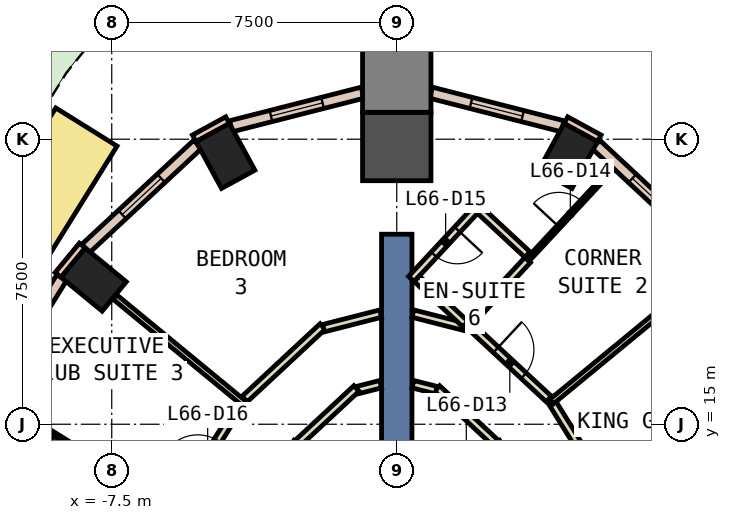
"""IFC4 building model, lengths in metres.
Left out: names, types, materials, properties, quantities, classifications, styles, units other than length and angle.
Written with IfcOpenShell. Run it as: python <this file> out.ifc"""

import sys

from ifc_helpers import new_model, si_unit, direction, frame, frame_2d, origin, origin_2d, place, context, subcontext, project, spatial, rectangle, extrude, element, fill, save


model = new_model("IFC4")
c1 = context("Model", 3, precision=1e-05, world=origin(), true_north=direction((0.0, 1.0)))
c2 = subcontext(c1, "Body", "Model", "MODEL_VIEW")
j1 = project(units=[si_unit("LENGTHUNIT", "METRE"), si_unit("PLANEANGLEUNIT", "RADIAN")], contexts=[c1])
p1 = place(None, origin())
s1 = spatial("IfcSite", under=j1, at=p1, CompositionType="ELEMENT")
p2 = place(p1, origin())
s2 = spatial("IfcBuilding", under=s1, at=p2, CompositionType="ELEMENT")
p3 = place(p2, frame((0.0, 0.0, 286.4)))
s3 = spatial("IfcBuildingStorey", under=s2, at=p3, CompositionType="ELEMENT", Elevation=286.4)
p4 = place(p3, frame((4.507, 22.059, 0.0), z_axis=(0.0, 0.0, 1.0), x_axis=(-0.877899414566, 0.478845087586, 0.0)))
e1 = element("IfcColumn", 1, at=p4, inside=s3, PredefinedType="COLUMN", context=c2, shape_type="SweptSolid", body=[
    extrude(rectangle(XDim=1.0, YDim=1.4, at=origin_2d()), origin(), (0.0, 0.0, 1.0), 3.26),
])
p5 = place(p3, frame((0.0, 22.308, 0.0), z_axis=(0.0, 0.0, 1.0), x_axis=(0.0, 1.0, 0.0)))
e2 = element("IfcColumn", 2, at=p5, inside=s3, PredefinedType="COLUMN", context=c2, shape_type="SweptSolid", body=[
    extrude(rectangle(XDim=1.8, YDim=1.8, at=origin_2d()), origin(), (0.0, 0.0, 1.0), 3.26),
])
for number, where, z_axis, x_axis in (
    (3, (-4.507, 22.059, 0.0), (0.0, 0.0, 1.0), (0.878, 0.479, 0.0)),
    (4, (-7.975, 18.807, 0.0), (0.0, 0.0, 1.0), (0.636, 0.772, 0.0)),
):
    element("IfcColumn", number, at=place(p3, frame(where, z_axis=z_axis, x_axis=x_axis)), inside=s3, PredefinedType="COLUMN", context=c2, shape_type="SweptSolid", body=[
        extrude(rectangle(XDim=1.0, YDim=1.4, at=origin_2d()), origin(), (0.0, 0.0, 1.0), 3.26),
    ])
p6 = place(p3, frame((0.0, 24.108, 0.0), z_axis=(0.0, 0.0, 1.0), x_axis=(0.0, 1.0, 0.0)))
e5 = element("IfcColumn", 5, at=p6, inside=s3, PredefinedType="COLUMN", context=c2, shape_type="SweptSolid", body=[
    extrude(rectangle(XDim=1.8, YDim=1.8, at=origin_2d()), origin(), (0.0, 0.0, 1.0), 3.26),
])
p7 = place(p3, frame((0.0, 11.0, -0.6), z_axis=(0.0, 0.0, 1.0), x_axis=(0.0, 1.0, 0.0)))
e6 = element("IfcWall", 6, at=p7, inside=s3, PredefinedType="SHEAR", context=c2, shape_type="SweptSolid", body=[
    extrude(rectangle(XDim=9.0, YDim=0.8, at=frame_2d((4.5, 0.0))), origin(), (0.0, 0.0, 1.0), 3.86),
])
for number, where, z_axis, x_axis in (
    (7, (5.329, 22.522, 0.0), (0.0, 0.0, 1.0), (-0.878, 0.479, 0.0)),
    (8, (-4.451, 23.001, 0.0), (0.0, 0.0, 1.0), (-0.878, -0.479, 0.0)),
    (9, (-8.275, 19.701, 0.0), (0.0, 0.0, 1.0), (-0.636, -0.772, 0.0)),
):
    element("IfcWall", number, at=place(p3, frame(where, z_axis=z_axis, x_axis=x_axis)), inside=s3, PredefinedType="STANDARD", context=c2, shape_type="SweptSolid", body=[
        extrude(rectangle(XDim=1.0, YDim=0.2, at=frame_2d((0.5, 0.0))), origin(), (0.0, 0.0, 1.0), 3.26),
    ])
p8 = place(p3, frame((8.184, 19.626, 0.0), z_axis=(0.0, 0.0, 1.0), x_axis=(-0.732397380344, 0.680877431896, 0.0)))
e10 = element("IfcWall", 10, at=p8, inside=s3, PredefinedType="STANDARD", context=c2, shape_type="SweptSolid", body=[
    extrude(rectangle(XDim=4.019, YDim=0.3, at=frame_2d((2.009, 0.0))), origin(), (0.0, 0.0, 1.0), 3.26),
])
p9 = place(p8, frame((1.309, 0.0, 0.9)))
e11 = element("IfcOpeningElement", 11, at=p9, cuts=e10, PredefinedType="OPENING", context=c2, shape_type="SweptSolid", body=[
    extrude(rectangle(XDim=1.4, YDim=2.0, at=frame_2d((0.7, 1.0))), frame((0.0, 0.16, 0.0), z_axis=(0.0, -1.0, 0.0), x_axis=(1.0, 0.0, 0.0)), (0.0, 0.0, 1.0), 0.32),
])
p10 = place(p3, frame((4.365, 22.84, 0.0), z_axis=(0.0, 0.0, 1.0), x_axis=(-0.968979290476, 0.247141932156, 0.0)))
e12 = element("IfcWall", 12, at=p10, inside=s3, PredefinedType="STANDARD", context=c2, shape_type="SweptSolid", body=[
    extrude(rectangle(XDim=3.577, YDim=0.3, at=frame_2d((1.789, 0.0))), origin(), (0.0, 0.0, 1.0), 3.26),
])
p11 = place(p10, frame((1.088, 0.0, 0.9)))
e13 = element("IfcOpeningElement", 13, at=p11, cuts=e12, PredefinedType="OPENING", context=c2, shape_type="SweptSolid", body=[
    extrude(rectangle(XDim=1.4, YDim=2.0, at=frame_2d((0.7, 1.0))), frame((0.0, 0.16, 0.0), z_axis=(0.0, -1.0, 0.0), x_axis=(1.0, 0.0, 0.0)), (0.0, 0.0, 1.0), 0.32),
])
p12 = place(p3, frame((-0.899, 23.724, 0.0), z_axis=(0.0, 0.0, 1.0), x_axis=(-0.968979290476, -0.247141932156, 0.0)))
e14 = element("IfcWall", 14, at=p12, inside=s3, PredefinedType="STANDARD", context=c2, shape_type="SweptSolid", body=[
    extrude(rectangle(XDim=3.577, YDim=0.3, at=frame_2d((1.789, 0.0))), origin(), (0.0, 0.0, 1.0), 3.26),
])
p13 = place(p12, frame((1.088, 0.0, 0.9)))
e15 = element("IfcOpeningElement", 15, at=p13, cuts=e14, PredefinedType="OPENING", context=c2, shape_type="SweptSolid", body=[
    extrude(rectangle(XDim=1.4, YDim=2.0, at=frame_2d((0.7, 1.0))), frame((0.0, 0.16, 0.0), z_axis=(0.0, -1.0, 0.0), x_axis=(1.0, 0.0, 0.0)), (0.0, 0.0, 1.0), 0.32),
])
p14 = place(p3, frame((-5.241, 22.362, 0.0), z_axis=(0.0, 0.0, 1.0), x_axis=(-0.732397380344, -0.680877431896, 0.0)))
e16 = element("IfcWall", 16, at=p14, inside=s3, PredefinedType="STANDARD", context=c2, shape_type="SweptSolid", body=[
    extrude(rectangle(XDim=4.019, YDim=0.3, at=frame_2d((2.009, 0.0))), origin(), (0.0, 0.0, 1.0), 3.26),
])
p15 = place(p14, frame((1.309, 0.0, 0.9)))
e17 = element("IfcOpeningElement", 17, at=p15, cuts=e16, PredefinedType="OPENING", context=c2, shape_type="SweptSolid", body=[
    extrude(rectangle(XDim=1.4, YDim=2.0, at=frame_2d((0.7, 1.0))), frame((0.0, 0.16, 0.0), z_axis=(0.0, -1.0, 0.0), x_axis=(1.0, 0.0, 0.0)), (0.0, 0.0, 1.0), 0.32),
])
p16 = place(p3, frame((-8.819, 18.855, 0.0), z_axis=(0.0, 0.0, 1.0), x_axis=(-0.527762071678, -0.849392250788, 0.0)))
e18 = element("IfcWall", 18, at=p16, inside=s3, PredefinedType="STANDARD", context=c2, shape_type="SweptSolid", body=[
    extrude(rectangle(XDim=7.276, YDim=0.3, at=frame_2d((3.638, 0.0))), origin(), (0.0, 0.0, 1.0), 3.26),
])
p17 = place(p16, frame((0.719, 0.0, 0.9)))
e19 = element("IfcOpeningElement", 19, at=p17, cuts=e18, PredefinedType="OPENING", context=c2, shape_type="SweptSolid", body=[
    extrude(rectangle(XDim=2.2, YDim=2.0, at=frame_2d((1.1, 1.0))), frame((0.0, 0.16, 0.0), z_axis=(0.0, -1.0, 0.0), x_axis=(1.0, 0.0, 0.0)), (0.0, 0.0, 1.0), 0.32),
])
p18 = place(p16, frame((4.357, 0.0, 0.9)))
e20 = element("IfcOpeningElement", 20, at=p18, cuts=e18, PredefinedType="OPENING", context=c2, shape_type="SweptSolid", body=[
    extrude(rectangle(XDim=2.2, YDim=2.0, at=frame_2d((1.1, 1.0))), frame((0.0, 0.16, 0.0), z_axis=(0.0, -1.0, 0.0), x_axis=(1.0, 0.0, 0.0)), (0.0, 0.0, 1.0), 0.32),
])
p19 = place(p3, frame((-8.167, 22.821, 0.0), z_axis=(0.0, 0.0, 1.0), x_axis=(-0.528631074262, -0.848851687472, 0.0)))
e21 = element("IfcWall", 21, at=p19, inside=s3, PredefinedType="STANDARD", context=c2, shape_type="SweptSolid", body=[
    extrude(rectangle(XDim=4.799, YDim=1.9, at=frame_2d((2.4, 0.0))), origin(), (0.0, 0.0, 1.0), 0.8),
])
p20 = place(p3, frame((2.6, 14.509, 0.0), z_axis=(0.0, 0.0, 1.0), x_axis=(-0.732355024595, 0.680922989735, 0.0)))
e22 = element("IfcWall", 22, at=p20, inside=s3, PredefinedType="PARTITIONING", context=c2, shape_type="SweptSolid", body=[
    extrude(rectangle(XDim=2.103, YDim=0.2, at=frame_2d((1.051, 0.0))), origin(), (0.0, 0.0, 1.0), 3.26),
])
for number, where, z_axis, x_axis in (
    (23, (1.036, 15.898, 0.0), (0.0, 0.0, 1.0), (-0.969, 0.247, 0.0)),
    (24, (-0.425, 16.054, 0.0), (0.0, 0.0, 1.0), (-0.969, -0.247, 0.0)),
):
    element("IfcWall", number, at=place(p3, frame(where, z_axis=z_axis, x_axis=x_axis)), inside=s3, PredefinedType="PARTITIONING", context=c2, shape_type="SweptSolid", body=[
        extrude(rectangle(XDim=0.63, YDim=0.2, at=frame_2d((0.315, 0.0))), origin(), (0.0, 0.0, 1.0), 3.26),
    ])
p21 = place(p3, frame((-1.06, 15.941, 0.0), z_axis=(0.0, 0.0, 1.0), x_axis=(-0.732355024595, -0.680922989735, 0.0)))
e25 = element("IfcWall", 25, at=p21, inside=s3, PredefinedType="PARTITIONING", context=c2, shape_type="SweptSolid", body=[
    extrude(rectangle(XDim=2.103, YDim=0.2, at=frame_2d((1.051, 0.0))), origin(), (0.0, 0.0, 1.0), 3.26),
])
p22 = place(p3, frame((4.022, 15.68, 0.0), z_axis=(0.0, 0.0, 1.0), x_axis=(0.527737948498, -0.849407239029, 0.0)))
e26 = element("IfcWall", 26, at=p22, inside=s3, PredefinedType="PARTITIONING", context=c2, shape_type="SweptSolid", body=[
    extrude(rectangle(XDim=5.217, YDim=0.2, at=frame_2d((2.608, 0.0))), origin(), (0.0, 0.0, 1.0), 3.26),
])
p23 = place(p22, frame((2.159, 0.0, 0.0)))
e27 = element("IfcOpeningElement", 27, at=p23, cuts=e26, PredefinedType="OPENING", context=c2, shape_type="SweptSolid", body=[
    extrude(rectangle(XDim=1.0, YDim=2.1, at=frame_2d((0.5, 1.05))), frame((0.0, 0.11, 0.0), z_axis=(0.0, -1.0, 0.0), x_axis=(1.0, 0.0, 0.0)), (0.0, 0.0, 1.0), 0.22),
])
p24 = place(p3, frame((1.949, 17.572, 0.0), z_axis=(0.0, 0.0, 1.0), x_axis=(0.732331154554, -0.680948661846, 0.0)))
e28 = element("IfcWall", 28, at=p24, inside=s3, PredefinedType="PARTITIONING", context=c2, shape_type="SweptSolid", body=[
    extrude(rectangle(XDim=2.803, YDim=0.2, at=frame_2d((1.402, 0.0))), origin(), (0.0, 0.0, 1.0), 3.26),
])
p25 = place(p24, frame((0.901, 0.0, 0.0)))
e29 = element("IfcOpeningElement", 29, at=p25, cuts=e28, PredefinedType="OPENING", context=c2, shape_type="SweptSolid", body=[
    extrude(rectangle(XDim=1.0, YDim=2.1, at=frame_2d((0.5, 1.05))), frame((0.0, 0.11, 0.0), z_axis=(0.0, -1.0, 0.0), x_axis=(1.0, 0.0, 0.0)), (0.0, 0.0, 1.0), 0.22),
])
p26 = place(p3, frame((-4.002, 15.663, 0.0), z_axis=(0.0, 0.0, 1.0), x_axis=(0.732331154554, 0.680948661846, 0.0)))
e30 = element("IfcWall", 30, at=p26, inside=s3, PredefinedType="PARTITIONING", context=c2, shape_type="SweptSolid", body=[
    extrude(rectangle(XDim=2.803, YDim=0.2, at=frame_2d((1.402, 0.0))), origin(), (0.0, 0.0, 1.0), 3.26),
])
p27 = place(p3, frame((-1.926, 17.528, 0.0), z_axis=(0.0, 0.0, 1.0), x_axis=(0.968981980879, 0.247131383542, 0.0)))
e31 = element("IfcWall", 31, at=p27, inside=s3, PredefinedType="PARTITIONING", context=c2, shape_type="SweptSolid", body=[
    extrude(rectangle(XDim=1.549, YDim=0.2, at=frame_2d((0.774, 0.0))), origin(), (0.0, 0.0, 1.0), 3.26),
])
p28 = place(p3, frame((0.425, 17.911, 0.0), z_axis=(0.0, 0.0, 1.0), x_axis=(0.969051069597, -0.246860334023, 0.0)))
e32 = element("IfcWall", 32, at=p28, inside=s3, PredefinedType="PARTITIONING", context=c2, shape_type="SweptSolid", body=[
    extrude(rectangle(XDim=1.474, YDim=0.2, at=frame_2d((0.737, 0.0))), origin(), (0.0, 0.0, 1.0), 3.26),
])
p29 = place(p3, frame((-5.889, 12.675, 0.0), z_axis=(0.0, 0.0, 1.0), x_axis=(0.527550626699, 0.849523593709, 0.0)))
e33 = element("IfcWall", 33, at=p29, inside=s3, PredefinedType="PARTITIONING", context=c2, shape_type="SweptSolid", body=[
    extrude(rectangle(XDim=3.463, YDim=0.2, at=frame_2d((1.731, 0.0))), origin(), (0.0, 0.0, 1.0), 3.26),
])
p30 = place(p29, frame((1.231, 0.0, 0.0)))
e34 = element("IfcOpeningElement", 34, at=p30, cuts=e33, PredefinedType="OPENING", context=c2, shape_type="SweptSolid", body=[
    extrude(rectangle(XDim=1.0, YDim=2.1, at=frame_2d((0.5, 1.05))), frame((0.0, 0.11, 0.0), z_axis=(0.0, -1.0, 0.0), x_axis=(1.0, 0.0, 0.0)), (0.0, 0.0, 1.0), 0.22),
])
p31 = place(p3, frame((4.075, 15.595, 0.0), z_axis=(0.0, 0.0, 1.0), x_axis=(0.771899326406, 0.635744783616, 0.0)))
e35 = element("IfcWall", 35, at=p31, inside=s3, PredefinedType="PARTITIONING", context=c2, shape_type="SweptSolid", body=[
    extrude(rectangle(XDim=4.332, YDim=0.15, at=frame_2d((2.166, 0.0))), origin(), (0.0, 0.0, 1.0), 3.26),
])
p32 = place(p3, frame((3.444, 19.322, 0.0), z_axis=(0.0, 0.0, 1.0), x_axis=(0.68085394361, 0.732419215662, 0.0)))
e36 = element("IfcWall", 36, at=p32, inside=s3, PredefinedType="PARTITIONING", context=c2, shape_type="SweptSolid", body=[
    extrude(rectangle(XDim=3.3, YDim=0.1, at=frame_2d((1.65, 0.0))), origin(), (0.0, 0.0, 1.0), 3.26),
])
p33 = place(p32, frame((1.2, 0.0, 0.0)))
e37 = element("IfcOpeningElement", 37, at=p33, cuts=e36, PredefinedType="OPENING", context=c2, shape_type="SweptSolid", body=[
    extrude(rectangle(XDim=0.9, YDim=2.1, at=frame_2d((0.45, 1.05))), frame((0.0, 0.06, 0.0), z_axis=(0.0, -1.0, 0.0), x_axis=(1.0, 0.0, 0.0)), (0.0, 0.0, 1.0), 0.12),
])
p34 = place(p3, frame((1.776, 17.528, 0.0), z_axis=(0.0, 0.0, 1.0), x_axis=(0.680978439741, 0.732303464834, 0.0)))
e38 = element("IfcWall", 38, at=p34, inside=s3, PredefinedType="PARTITIONING", context=c2, shape_type="SweptSolid", body=[
    extrude(rectangle(XDim=2.45, YDim=0.2, at=frame_2d((1.225, 0.0))), origin(), (0.0, 0.0, 1.0), 3.26),
])
p35 = place(p3, frame((3.439, 19.464, 0.0), z_axis=(0.0, 0.0, 1.0), x_axis=(-0.732491549411, 0.68077612329, 0.0)))
e39 = element("IfcWall", 39, at=p35, inside=s3, PredefinedType="PARTITIONING", context=c2, shape_type="SweptSolid", body=[
    extrude(rectangle(XDim=1.699, YDim=0.2, at=frame_2d((0.85, 0.0))), origin(), (0.0, 0.0, 1.0), 3.26),
])
p36 = place(p3, frame((2.189, 20.763, 0.0), z_axis=(0.0, 0.0, 1.0), x_axis=(-0.680987945319, -0.73229462536, 0.0)))
e40 = element("IfcWall", 40, at=p36, inside=s3, PredefinedType="PARTITIONING", context=c2, shape_type="SweptSolid", body=[
    extrude(rectangle(XDim=2.65, YDim=0.2, at=frame_2d((1.325, 0.0))), origin(), (0.0, 0.0, 1.0), 3.26),
])
p37 = place(p36, frame((0.875, 0.0, 0.0)))
e41 = element("IfcOpeningElement", 41, at=p37, cuts=e40, PredefinedType="OPENING", context=c2, shape_type="SweptSolid", body=[
    extrude(rectangle(XDim=0.9, YDim=2.1, at=frame_2d((0.45, 1.05))), frame((0.0, 0.11, 0.0), z_axis=(0.0, -1.0, 0.0), x_axis=(1.0, 0.0, 0.0)), (0.0, 0.0, 1.0), 0.22),
])
p38 = place(p3, frame((0.526, 18.827, 0.0), z_axis=(0.0, 0.0, 1.0), x_axis=(0.732112296378, -0.681183958628, 0.0)))
e42 = element("IfcWall", 42, at=p38, inside=s3, PredefinedType="PARTITIONING", context=c2, shape_type="SweptSolid", body=[
    extrude(rectangle(XDim=1.75, YDim=0.2, at=frame_2d((0.875, 0.0))), origin(), (0.0, 0.0, 1.0), 3.26),
])
p39 = place(p3, frame((-3.998, 15.532, 0.0), z_axis=(0.0, 0.0, 1.0), x_axis=(-0.771938186867, 0.635697597649, 0.0)))
e43 = element("IfcWall", 43, at=p39, inside=s3, PredefinedType="PARTITIONING", context=c2, shape_type="SweptSolid", body=[
    extrude(rectangle(XDim=4.432, YDim=0.15, at=frame_2d((2.216, 0.0))), origin(), (0.0, 0.0, 1.0), 3.26),
])
p40 = place(p3, frame((-8.13, 14.185, 0.0), z_axis=(0.0, 0.0, 1.0), x_axis=(-0.849305726881, 0.527901299759, 0.0)))
e44 = element("IfcWall", 44, at=p40, inside=s3, PredefinedType="PARTITIONING", context=c2, shape_type="SweptSolid", body=[
    extrude(rectangle(XDim=2.9, YDim=0.1, at=frame_2d((1.45, 0.0))), origin(), (0.0, 0.0, 1.0), 3.26),
])
p41 = place(p40, frame((1.0, 0.0, 0.0)))
e45 = element("IfcOpeningElement", 45, at=p41, cuts=e44, PredefinedType="OPENING", context=c2, shape_type="SweptSolid", body=[
    extrude(rectangle(XDim=0.9, YDim=2.1, at=frame_2d((0.45, 1.05))), frame((0.0, 0.06, 0.0), z_axis=(0.0, -1.0, 0.0), x_axis=(1.0, 0.0, 0.0)), (0.0, 0.0, 1.0), 0.12),
])
p42 = place(p9, origin())
e46 = element("IfcWindow", 46, at=p42, inside=s3, PartitioningType="SINGLE_PANEL", PredefinedType="WINDOW", context=c2, shape_type="SweptSolid", body=[
    extrude(rectangle(XDim=1.4, YDim=2.0, at=frame_2d((0.7, 1.0))), frame((0.0, 0.03, 0.0), z_axis=(0.0, -1.0, 0.0), x_axis=(1.0, 0.0, 0.0)), (0.0, 0.0, 1.0), 0.06),
])
fill(e11, e46)
p43 = place(p11, origin())
e47 = element("IfcWindow", 47, at=p43, inside=s3, PartitioningType="SINGLE_PANEL", PredefinedType="WINDOW", context=c2, shape_type="SweptSolid", body=[
    extrude(rectangle(XDim=1.4, YDim=2.0, at=frame_2d((0.7, 1.0))), frame((0.0, 0.03, 0.0), z_axis=(0.0, -1.0, 0.0), x_axis=(1.0, 0.0, 0.0)), (0.0, 0.0, 1.0), 0.06),
])
fill(e13, e47)
p44 = place(p13, origin())
e48 = element("IfcWindow", 48, at=p44, inside=s3, PartitioningType="SINGLE_PANEL", PredefinedType="WINDOW", context=c2, shape_type="SweptSolid", body=[
    extrude(rectangle(XDim=1.4, YDim=2.0, at=frame_2d((0.7, 1.0))), frame((0.0, 0.03, 0.0), z_axis=(0.0, -1.0, 0.0), x_axis=(1.0, 0.0, 0.0)), (0.0, 0.0, 1.0), 0.06),
])
fill(e15, e48)
p45 = place(p15, origin())
e49 = element("IfcWindow", 49, at=p45, inside=s3, PartitioningType="SINGLE_PANEL", PredefinedType="WINDOW", context=c2, shape_type="SweptSolid", body=[
    extrude(rectangle(XDim=1.4, YDim=2.0, at=frame_2d((0.7, 1.0))), frame((0.0, 0.03, 0.0), z_axis=(0.0, -1.0, 0.0), x_axis=(1.0, 0.0, 0.0)), (0.0, 0.0, 1.0), 0.06),
])
fill(e17, e49)
p46 = place(p25, origin())
e50 = element("IfcDoor", 50, at=p46, inside=s3, OperationType="SINGLE_SWING_LEFT", PredefinedType="DOOR", context=c2, shape_type="SweptSolid", body=[
    extrude(rectangle(XDim=1.0, YDim=2.1, at=frame_2d((0.5, 1.05))), frame((0.0, 0.025, 0.0), z_axis=(0.0, -1.0, 0.0), x_axis=(1.0, 0.0, 0.0)), (0.0, 0.0, 1.0), 0.05),
])
fill(e29, e50)
p47 = place(p33, origin())
e51 = element("IfcDoor", 51, at=p47, inside=s3, OperationType="SINGLE_SWING_LEFT", PredefinedType="DOOR", context=c2, shape_type="SweptSolid", body=[
    extrude(rectangle(XDim=0.9, YDim=2.1, at=frame_2d((0.45, 1.05))), frame((0.0, 0.025, 0.0), z_axis=(0.0, -1.0, 0.0), x_axis=(1.0, 0.0, 0.0)), (0.0, 0.0, 1.0), 0.05),
])
fill(e37, e51)
p48 = place(p37, origin())
e52 = element("IfcDoor", 52, at=p48, inside=s3, OperationType="SINGLE_SWING_LEFT", PredefinedType="DOOR", context=c2, shape_type="SweptSolid", body=[
    extrude(rectangle(XDim=0.9, YDim=2.1, at=frame_2d((0.45, 1.05))), frame((0.0, 0.025, 0.0), z_axis=(0.0, -1.0, 0.0), x_axis=(1.0, 0.0, 0.0)), (0.0, 0.0, 1.0), 0.05),
])
fill(e41, e52)
p49 = place(p41, origin())
e53 = element("IfcDoor", 53, at=p49, inside=s3, OperationType="SINGLE_SWING_LEFT", PredefinedType="DOOR", context=c2, shape_type="SweptSolid", body=[
    extrude(rectangle(XDim=0.9, YDim=2.1, at=frame_2d((0.45, 1.05))), frame((0.0, 0.025, 0.0), z_axis=(0.0, -1.0, 0.0), x_axis=(1.0, 0.0, 0.0)), (0.0, 0.0, 1.0), 0.05),
])
fill(e45, e53)
save(model, sys.argv[1])
